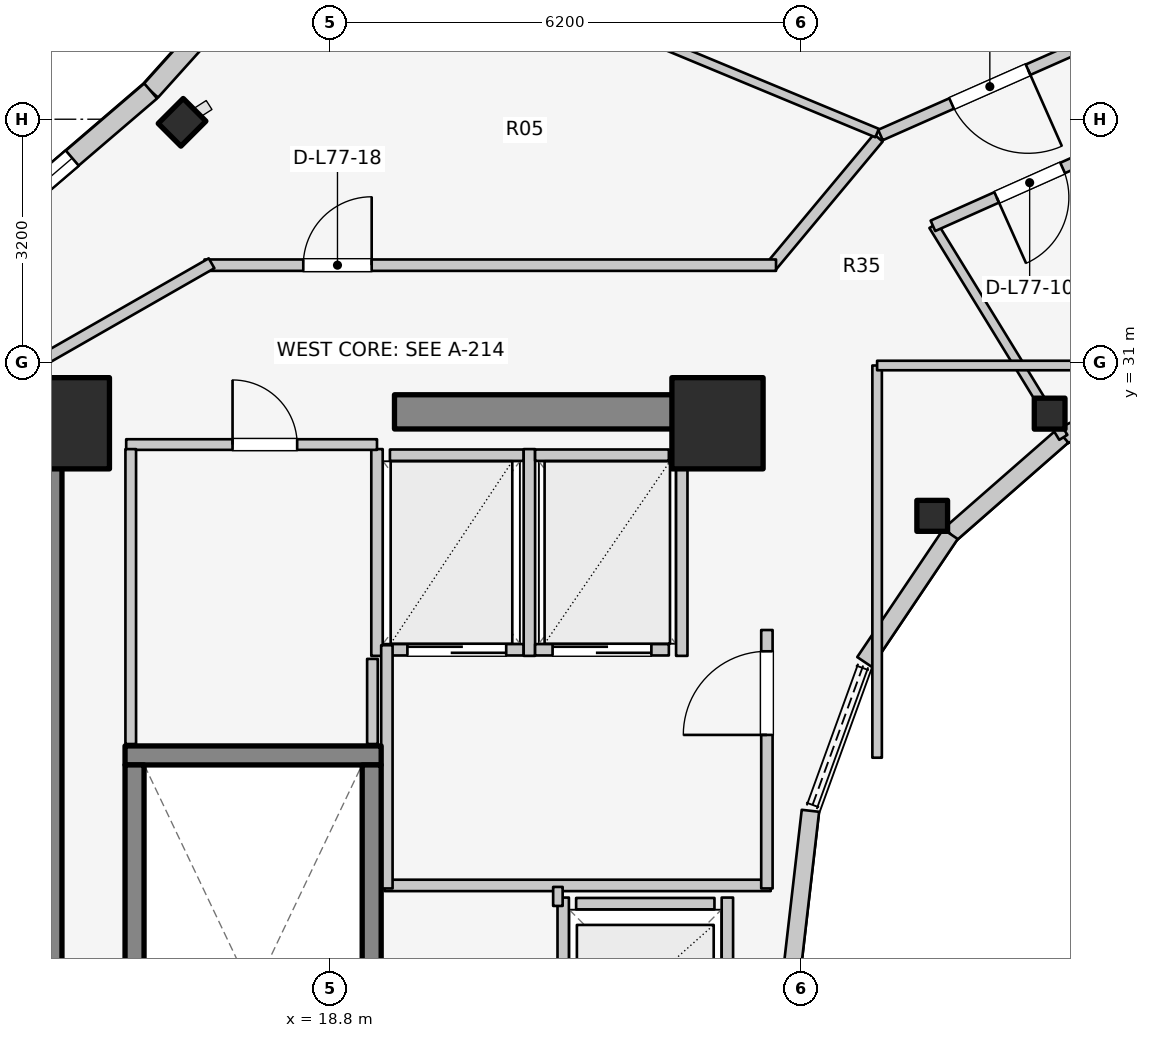
"""IFC4 building model, lengths in metres.
Left out: names, types, materials, properties, quantities, classifications, styles, units other than length and angle.
Written with IfcOpenShell. Run it as: python <this file> out.ifc"""

import sys

from ifc_helpers import new_model, si_unit, direction, frame, frame_2d, origin, origin_2d, place, context, subcontext, project, spatial, rectangle, i_section, extrude, element, fill, save


model = new_model("IFC4")
c1 = context("Model", 3, precision=1e-05, world=origin(), true_north=direction((0.0, 1.0)))
c2 = subcontext(c1, "Body", "Model", "MODEL_VIEW")
j1 = project(units=[si_unit("LENGTHUNIT", "METRE"), si_unit("PLANEANGLEUNIT", "RADIAN")], contexts=[c1])
p1 = place(None, origin())
s1 = spatial("IfcSite", under=j1, at=p1, CompositionType="ELEMENT")
p2 = place(p1, origin())
s2 = spatial("IfcBuilding", under=s1, at=p2, CompositionType="ELEMENT")
p3 = place(p2, frame((0.0, 0.0, 253.2)))
s3 = spatial("IfcBuildingStorey", under=s2, at=p3, CompositionType="ELEMENT", Elevation=253.2)
p4 = place(p3, frame((15.05, 17.05, 0.0), z_axis=(0.0, 0.0, 1.0), x_axis=(0.0, 1.0, 0.0)))
e1 = element("IfcWall", 1, at=p4, inside=s3, PredefinedType="SHEAR", context=c2, shape_type="SweptSolid", body=[
    extrude(rectangle(XDim=12.8, YDim=0.45, at=frame_2d((6.4, 0.0))), origin(), (0.0, 0.0, 1.0), 3.6),
])
p5 = place(p3, frame((19.65, 30.35, 0.0), z_axis=(0.0, 0.0, 1.0), x_axis=(1.0, 0.0, 0.0)))
e2 = element("IfcWall", 2, at=p5, inside=s3, PredefinedType="SHEAR", context=c2, shape_type="SweptSolid", body=[
    extrude(rectangle(XDim=4.5, YDim=0.45, at=frame_2d((2.25, 0.0))), origin(), (0.0, 0.0, 1.0), 3.6),
])
p6 = place(p3, frame((16.105, 25.83, 0.0), z_axis=(0.0, 0.0, 1.0), x_axis=(1.0, 0.0, 0.0)))
e3 = element("IfcWall", 3, at=p6, inside=s3, PredefinedType="SOLIDWALL", context=c2, shape_type="SweptSolid", body=[
    extrude(rectangle(XDim=3.37, YDim=0.25, at=frame_2d((1.685, 0.0))), origin(), (0.0, 0.0, 1.0), 3.6),
])
for number, where, z_axis, x_axis in (
    (4, (16.23, 17.895, 0.0), (0.0, 0.0, 1.0), (0.0, 1.0, 0.0)),
    (5, (19.35, 17.895, 0.0), (0.0, 0.0, 1.0), (0.0, 1.0, 0.0)),
):
    element("IfcWall", number, at=place(p3, frame(where, z_axis=z_axis, x_axis=x_axis)), inside=s3, PredefinedType="SOLIDWALL", context=c2, shape_type="SweptSolid", body=[
        extrude(rectangle(XDim=7.81, YDim=0.25, at=frame_2d((3.905, 0.0))), origin(), (0.0, 0.0, 1.0), 3.6),
    ])
for number, where, z_axis, x_axis in (
    (6, (23.9, 30.2, 0.0), (0.0, 0.0, 1.0), (1.0, 0.0, 0.0)),
    (7, (15.3, 30.2, 0.0), (0.0, 0.0, 1.0), (1.0, 0.0, 0.0)),
):
    element("IfcColumn", number, at=place(p3, frame(where, z_axis=z_axis, x_axis=x_axis)), inside=s3, PredefinedType="COLUMN", context=c2, shape_type="SweptSolid", body=[
        extrude(rectangle(XDim=1.2, YDim=1.2, at=origin_2d()), origin(), (0.0, 0.0, 1.0), 3.6),
    ])
for number, where, z_axis, x_axis in (
    (8, (28.27, 30.327, 0.0), (0.0, 0.0, 1.0), (1.0, 0.0, 0.0)),
    (9, (26.725, 28.982, 0.0), (0.0, 0.0, 1.0), (1.0, 0.0, 0.0)),
):
    element("IfcColumn", number, at=place(p3, frame(where, z_axis=z_axis, x_axis=x_axis)), inside=s3, PredefinedType="COLUMN", context=c2, shape_type="SweptSolid", body=[
        extrude(i_section(OverallWidth=0.404, OverallDepth=0.407, WebThickness=0.027, FlangeThickness=0.044, FilletRadius=0.025, at=origin_2d()), origin(), (0.0, 0.0, 1.0), 3.6),
    ])
p7 = place(p3, frame((16.855, 34.159, 0.0), z_axis=(0.0, 0.0, 1.0), x_axis=(-0.707106781187, 0.707106781187, 0.0)))
e10 = element("IfcColumn", 10, at=p7, inside=s3, PredefinedType="COLUMN", context=c2, shape_type="SweptSolid", body=[
    extrude(i_section(OverallWidth=0.422, OverallDepth=0.465, WebThickness=0.045, FlangeThickness=0.073, FilletRadius=0.025, at=origin_2d()), origin(), (0.0, 0.0, 1.0), 3.6),
])
p8 = place(p3, frame((30.157, 30.843, 0.0), z_axis=(0.0, 0.0, 1.0), x_axis=(-0.904179699603, -0.427152280606, 0.0)))
e11 = element("IfcWall", 11, at=p8, inside=s3, PredefinedType="STANDARD", context=c2, shape_type="SweptSolid", body=[
    extrude(rectangle(XDim=1.899, YDim=0.23, at=frame_2d((0.95, 0.0))), origin(), (0.0, 0.0, 1.0), 2.6),
])
p9 = place(p3, frame((28.44, 30.032, 0.0), z_axis=(0.0, 0.0, 1.0), x_axis=(-0.752576694707, -0.658504607869, 0.0)))
e12 = element("IfcWall", 12, at=p9, inside=s3, PredefinedType="STANDARD", context=c2, shape_type="SweptSolid", body=[
    extrude(rectangle(XDim=1.959, YDim=0.23, at=frame_2d((0.98, 0.0))), origin(), (0.0, 0.0, 1.0), 2.6),
])
p10 = place(p3, frame((26.965, 28.742, 0.0), z_axis=(0.0, 0.0, 1.0), x_axis=(-0.558197800898, -0.829707909492, 0.0)))
e13 = element("IfcWall", 13, at=p10, inside=s3, PredefinedType="STANDARD", context=c2, shape_type="SweptSolid", body=[
    extrude(rectangle(XDim=2.027, YDim=0.23, at=frame_2d((1.013, 0.0))), origin(), (0.0, 0.0, 1.0), 2.6),
])
p11 = place(p3, frame((25.123, 25.102, 0.0), z_axis=(0.0, 0.0, 1.0), x_axis=(-0.114711713601, -0.993398823617, 0.0)))
e14 = element("IfcWall", 14, at=p11, inside=s3, PredefinedType="STANDARD", context=c2, shape_type="SweptSolid", body=[
    extrude(rectangle(XDim=2.115, YDim=0.23, at=frame_2d((1.058, 0.0))), origin(), (0.0, 0.0, 1.0), 3.28),
])
p12 = place(p3, frame((20.13, 38.67, 0.0), z_axis=(0.0, 0.0, 1.0), x_axis=(-0.668903560134, -0.743349196031, 0.0)))
e15 = element("IfcWall", 15, at=p12, inside=s3, PredefinedType="STANDARD", context=c2, shape_type="SweptSolid", body=[
    extrude(rectangle(XDim=5.513, YDim=0.26, at=frame_2d((2.756, 0.0))), origin(), (0.0, 0.0, 1.0), 3.29),
])
p13 = place(p3, frame((16.442, 34.572, 0.0), z_axis=(0.0, 0.0, 1.0), x_axis=(-0.759587504333, -0.650405122413, 0.0)))
e16 = element("IfcWall", 16, at=p13, inside=s3, PredefinedType="STANDARD", context=c2, shape_type="SweptSolid", body=[
    extrude(rectangle(XDim=4.217, YDim=0.26, at=frame_2d((2.109, 0.0))), origin(), (0.0, 0.0, 1.0), 3.29),
])
p14 = place(p13, frame((1.359, 0.0, 0.75)))
e17 = element("IfcOpeningElement", 17, at=p14, cuts=e16, PredefinedType="OPENING", context=c2, shape_type="SweptSolid", body=[
    extrude(rectangle(XDim=1.5, YDim=1.6, at=frame_2d((0.75, 0.8))), frame((0.0, 0.14, 0.0), z_axis=(0.0, -1.0, 0.0), x_axis=(1.0, 0.0, 0.0)), (0.0, 0.0, 1.0), 0.28),
])
p15 = place(p3, frame((22.04, 23.88, 0.0), z_axis=(0.0, 0.0, 1.0), x_axis=(1.0, 0.0, 0.0)))
e18 = element("IfcWall", 18, at=p15, inside=s3, PredefinedType="SOLIDWALL", context=c2, shape_type="SweptSolid", body=[
    extrude(rectangle(XDim=1.82, YDim=0.15, at=frame_2d((0.91, 0.0))), origin(), (0.0, 0.0, 1.0), 2.62),
])
p16 = place(p3, frame((21.87, 21.64, 0.0), z_axis=(0.0, 0.0, 1.0), x_axis=(0.0, 1.0, 0.0)))
e19 = element("IfcWall", 19, at=p16, inside=s3, PredefinedType="SOLIDWALL", context=c2, shape_type="SweptSolid", body=[
    extrude(rectangle(XDim=2.32, YDim=0.15, at=frame_2d((1.16, 0.0))), origin(), (0.0, 0.0, 1.0), 3.295),
])
p17 = place(p3, frame((24.03, 21.64, 0.0), z_axis=(0.0, 0.0, 1.0), x_axis=(0.0, 1.0, 0.0)))
e20 = element("IfcWall", 20, at=p17, inside=s3, PredefinedType="SOLIDWALL", context=c2, shape_type="SweptSolid", body=[
    extrude(rectangle(XDim=2.32, YDim=0.15, at=frame_2d((1.16, 0.0))), origin(), (0.0, 0.0, 1.0), 2.62),
])
p18 = place(p3, frame((19.59, 27.22, 0.0), z_axis=(0.0, 0.0, 1.0), x_axis=(1.0, 0.0, 0.0)))
e21 = element("IfcWall", 21, at=p18, inside=s3, PredefinedType="SOLIDWALL", context=c2, shape_type="SweptSolid", body=[
    extrude(rectangle(XDim=1.76, YDim=0.15, at=frame_2d((0.88, 0.0))), origin(), (0.0, 0.0, 1.0), 3.295),
])
p19 = place(p18, frame((0.23, 0.0, 0.0)))
e22 = element("IfcOpeningElement", 22, at=p19, cuts=e21, PredefinedType="OPENING", context=c2, shape_type="SweptSolid", body=[
    extrude(rectangle(XDim=1.3, YDim=2.1, at=frame_2d((0.65, 1.05))), frame((0.0, 0.085, 0.0), z_axis=(0.0, -1.0, 0.0), x_axis=(1.0, 0.0, 0.0)), (0.0, 0.0, 1.0), 0.17),
])
p20 = place(p3, frame((19.59, 29.78, 0.0), z_axis=(0.0, 0.0, 1.0), x_axis=(1.0, 0.0, 0.0)))
e23 = element("IfcWall", 23, at=p20, inside=s3, PredefinedType="SOLIDWALL", context=c2, shape_type="SweptSolid", body=[
    extrude(rectangle(XDim=1.76, YDim=0.15, at=frame_2d((0.88, 0.0))), origin(), (0.0, 0.0, 1.0), 3.295),
])
for number, where, z_axis, x_axis in (
    (24, (19.42, 27.14, 0.0), (0.0, 0.0, 1.0), (0.0, 1.0, 0.0)),
    (25, (21.425, 27.14, 0.0), (0.0, 0.0, 1.0), (0.0, 1.0, 0.0)),
):
    element("IfcWall", number, at=place(p3, frame(where, z_axis=z_axis, x_axis=x_axis)), inside=s3, PredefinedType="SOLIDWALL", context=c2, shape_type="SweptSolid", body=[
        extrude(rectangle(XDim=2.72, YDim=0.15, at=frame_2d((1.36, 0.0))), origin(), (0.0, 0.0, 1.0), 3.295),
    ])
p21 = place(p3, frame((21.5, 27.22, 0.0), z_axis=(0.0, 0.0, 1.0), x_axis=(1.0, 0.0, 0.0)))
e26 = element("IfcWall", 26, at=p21, inside=s3, PredefinedType="SOLIDWALL", context=c2, shape_type="SweptSolid", body=[
    extrude(rectangle(XDim=1.76, YDim=0.15, at=frame_2d((0.88, 0.0))), origin(), (0.0, 0.0, 1.0), 3.295),
])
p22 = place(p21, frame((0.23, 0.0, 0.0)))
e27 = element("IfcOpeningElement", 27, at=p22, cuts=e26, PredefinedType="OPENING", context=c2, shape_type="SweptSolid", body=[
    extrude(rectangle(XDim=1.3, YDim=2.1, at=frame_2d((0.65, 1.05))), frame((0.0, 0.085, 0.0), z_axis=(0.0, -1.0, 0.0), x_axis=(1.0, 0.0, 0.0)), (0.0, 0.0, 1.0), 0.17),
])
p23 = place(p3, frame((21.5, 29.78, 0.0), z_axis=(0.0, 0.0, 1.0), x_axis=(1.0, 0.0, 0.0)))
e28 = element("IfcWall", 28, at=p23, inside=s3, PredefinedType="SOLIDWALL", context=c2, shape_type="SweptSolid", body=[
    extrude(rectangle(XDim=1.76, YDim=0.15, at=frame_2d((0.88, 0.0))), origin(), (0.0, 0.0, 1.0), 3.295),
])
p24 = place(p3, frame((23.43, 27.14, 0.0), z_axis=(0.0, 0.0, 1.0), x_axis=(0.0, 1.0, 0.0)))
e29 = element("IfcWall", 29, at=p24, inside=s3, PredefinedType="SOLIDWALL", context=c2, shape_type="SweptSolid", body=[
    extrude(rectangle(XDim=2.72, YDim=0.15, at=frame_2d((1.36, 0.0))), origin(), (0.0, 0.0, 1.0), 3.295),
])
p25 = place(p3, frame((19.52, 24.12, 0.0), z_axis=(0.0, 0.0, 1.0), x_axis=(1.0, 0.0, 0.0)))
e30 = element("IfcWall", 30, at=p25, inside=s3, PredefinedType="PARTITIONING", context=c2, shape_type="SweptSolid", body=[
    extrude(rectangle(XDim=5.08, YDim=0.15, at=frame_2d((2.54, 0.0))), origin(), (0.0, 0.0, 1.0), 2.62),
])
p26 = place(p3, frame((19.55, 24.08, 0.0), z_axis=(0.0, 0.0, 1.0), x_axis=(0.0, 1.0, 0.0)))
e31 = element("IfcWall", 31, at=p26, inside=s3, PredefinedType="PARTITIONING", context=c2, shape_type="SweptSolid", body=[
    extrude(rectangle(XDim=3.2, YDim=0.15, at=frame_2d((1.6, 0.0))), origin(), (0.0, 0.0, 1.0), 3.295),
])
p27 = place(p3, frame((24.55, 24.08, 0.0), z_axis=(0.0, 0.0, 1.0), x_axis=(0.0, 1.0, 0.0)))
e32 = element("IfcWall", 32, at=p27, inside=s3, PredefinedType="PARTITIONING", context=c2, shape_type="SweptSolid", body=[
    extrude(rectangle(XDim=3.4, YDim=0.15, at=frame_2d((1.7, 0.0))), origin(), (0.0, 0.0, 1.0), 3.295),
])
p28 = place(p27, frame((2.02, 0.0, 0.0)))
e33 = element("IfcOpeningElement", 33, at=p28, cuts=e32, PredefinedType="OPENING", context=c2, shape_type="SweptSolid", body=[
    extrude(rectangle(XDim=1.1, YDim=2.1, at=frame_2d((0.55, 1.05))), frame((0.0, 0.085, 0.0), z_axis=(0.0, -1.0, 0.0), x_axis=(1.0, 0.0, 0.0)), (0.0, 0.0, 1.0), 0.17),
])
p29 = place(p3, frame((21.8, 23.85, 0.0), z_axis=(0.0, 0.0, 1.0), x_axis=(0.0, 1.0, 0.0)))
e34 = element("IfcWall", 34, at=p29, inside=s3, PredefinedType="PARTITIONING", context=c2, shape_type="SweptSolid", body=[
    extrude(rectangle(XDim=0.25, YDim=0.125, at=frame_2d((0.125, 0.0))), origin(), (0.0, 0.0, 1.0), 3.295),
])
p30 = place(p3, frame((16.12, 29.92, 0.0), z_axis=(0.0, 0.0, 1.0), x_axis=(1.0, 0.0, 0.0)))
e35 = element("IfcWall", 35, at=p30, inside=s3, PredefinedType="PLUMBINGWALL", context=c2, shape_type="SweptSolid", body=[
    extrude(rectangle(XDim=3.3, YDim=0.14, at=frame_2d((1.65, 0.0))), origin(), (0.0, 0.0, 1.0), 3.295),
])
p31 = place(p30, frame((1.399, 0.0, 0.0)))
e36 = element("IfcOpeningElement", 36, at=p31, cuts=e35, PredefinedType="OPENING", context=c2, shape_type="SweptSolid", body=[
    extrude(rectangle(XDim=0.85, YDim=2.05, at=frame_2d((0.425, 1.025))), frame((0.0, 0.08, 0.0), z_axis=(0.0, -1.0, 0.0), x_axis=(1.0, 0.0, 0.0)), (0.0, 0.0, 1.0), 0.16),
])
p32 = place(p3, frame((16.18, 25.98, 0.0), z_axis=(0.0, 0.0, 1.0), x_axis=(0.0, 1.0, 0.0)))
e37 = element("IfcWall", 37, at=p32, inside=s3, PredefinedType="PLUMBINGWALL", context=c2, shape_type="SweptSolid", body=[
    extrude(rectangle(XDim=3.88, YDim=0.14, at=frame_2d((1.94, 0.0))), origin(), (0.0, 0.0, 1.0), 3.295),
])
p33 = place(p3, frame((19.36, 25.98, 0.0), z_axis=(0.0, 0.0, 1.0), x_axis=(0.0, 1.0, 0.0)))
e38 = element("IfcWall", 38, at=p33, inside=s3, PredefinedType="PLUMBINGWALL", context=c2, shape_type="SweptSolid", body=[
    extrude(rectangle(XDim=1.12, YDim=0.14, at=frame_2d((0.56, 0.0))), origin(), (0.0, 0.0, 1.0), 3.295),
])
p34 = place(p3, frame((28.45, 30.015, 0.0), z_axis=(0.0, 0.0, 1.0), x_axis=(-0.522763432117, 0.852477796802, 0.0)))
e39 = element("IfcWall", 39, at=p34, inside=s3, PredefinedType="PARTITIONING", context=c2, shape_type="SweptSolid", body=[
    extrude(rectangle(XDim=3.269, YDim=0.125, at=frame_2d((1.635, 0.0))), origin(), (0.0, 0.0, 1.0), 2.672),
])
p35 = place(p3, frame((29.28, 33.933, 0.0), z_axis=(0.0, 0.0, 1.0), x_axis=(-0.913254317828, -0.407389924971, 0.0)))
e40 = element("IfcWall", 40, at=p35, inside=s3, PredefinedType="PARTITIONING", context=c2, shape_type="SweptSolid", body=[
    extrude(rectangle(XDim=2.787, YDim=0.15, at=frame_2d((1.393, 0.0))), origin(), (0.0, 0.0, 1.0), 2.823),
])
p36 = place(p35, frame((0.918, 0.0, 0.0)))
e41 = element("IfcOpeningElement", 41, at=p36, cuts=e40, PredefinedType="OPENING", context=c2, shape_type="SweptSolid", body=[
    extrude(rectangle(XDim=0.95, YDim=2.1, at=frame_2d((0.475, 1.05))), frame((0.0, 0.085, 0.0), z_axis=(0.0, -1.0, 0.0), x_axis=(1.0, 0.0, 0.0)), (0.0, 0.0, 1.0), 0.17),
])
p37 = place(p3, frame((26.0, 25.8, 0.0), z_axis=(0.0, 0.0, 1.0), x_axis=(0.0, 1.0, 0.0)))
e42 = element("IfcWall", 42, at=p37, inside=s3, PredefinedType="PARTITIONING", context=c2, shape_type="SweptSolid", body=[
    extrude(rectangle(XDim=5.16, YDim=0.125, at=frame_2d((2.58, 0.0))), origin(), (0.0, 0.0, 1.0), 2.672),
])
p38 = place(p3, frame((26.0, 30.96, 0.0), z_axis=(0.0, 0.0, 1.0), x_axis=(1.0, 0.0, 0.0)))
e43 = element("IfcWall", 43, at=p38, inside=s3, PredefinedType="PARTITIONING", context=c2, shape_type="SweptSolid", body=[
    extrude(rectangle(XDim=2.6, YDim=0.125, at=frame_2d((1.3, 0.0))), origin(), (0.0, 0.0, 1.0), 2.816),
])
p39 = place(p3, frame((26.016, 33.955, 0.0), z_axis=(0.0, 0.0, 1.0), x_axis=(-0.64030392053, -0.76812166312, 0.0)))
e44 = element("IfcWall", 44, at=p39, inside=s3, PredefinedType="PARTITIONING", context=c2, shape_type="SweptSolid", body=[
    extrude(rectangle(XDim=2.21, YDim=0.15, at=frame_2d((1.105, 0.0))), origin(), (0.0, 0.0, 1.0), 2.816),
])
p40 = place(p3, frame((17.15, 32.28, 0.0), z_axis=(0.0, 0.0, 1.0), x_axis=(1.0, 0.0, 0.0)))
e45 = element("IfcWall", 45, at=p40, inside=s3, PredefinedType="PARTITIONING", context=c2, shape_type="SweptSolid", body=[
    extrude(rectangle(XDim=7.52, YDim=0.15, at=frame_2d((3.76, 0.0))), origin(), (0.0, 0.0, 1.0), 2.816),
])
p41 = place(p40, frame((1.3, 0.0, 0.0)))
e46 = element("IfcOpeningElement", 46, at=p41, cuts=e45, PredefinedType="OPENING", context=c2, shape_type="SweptSolid", body=[
    extrude(rectangle(XDim=0.9, YDim=2.1, at=frame_2d((0.45, 1.05))), frame((0.0, 0.085, 0.0), z_axis=(0.0, -1.0, 0.0), x_axis=(1.0, 0.0, 0.0)), (0.0, 0.0, 1.0), 0.17),
])
p42 = place(p3, frame((17.243, 32.305, 0.0), z_axis=(0.0, 0.0, 1.0), x_axis=(-0.867991349648, -0.496579315857, 0.0)))
e47 = element("IfcWall", 47, at=p42, inside=s3, PredefinedType="PARTITIONING", context=c2, shape_type="SweptSolid", body=[
    extrude(rectangle(XDim=2.567, YDim=0.15, at=frame_2d((1.283, 0.0))), origin(), (0.0, 0.0, 1.0), 2.66),
])
p43 = place(p3, frame((26.0, 34.018, 0.0), z_axis=(0.0, 0.0, 1.0), x_axis=(-0.92349333748, 0.383614462228, 0.0)))
e48 = element("IfcWall", 48, at=p43, inside=s3, PredefinedType="MOVABLE", context=c2, shape_type="SweptSolid", body=[
    extrude(rectangle(XDim=5.907, YDim=0.12, at=frame_2d((2.954, 0.0))), origin(), (0.0, 0.0, 1.0), 2.66),
])
p44 = place(p3, frame((28.923, 35.266, 0.0), z_axis=(0.0, 0.0, 1.0), x_axis=(-0.914526509772, -0.404525973115, 0.0)))
e49 = element("IfcWall", 49, at=p44, inside=s3, PredefinedType="PARTITIONING", context=c2, shape_type="SweptSolid", body=[
    extrude(rectangle(XDim=3.148, YDim=0.15, at=frame_2d((1.574, 0.0))), origin(), (0.0, 0.0, 1.0), 2.823),
])
p45 = place(p44, frame((1.024, 0.0, 0.0)))
e50 = element("IfcOpeningElement", 50, at=p45, cuts=e49, PredefinedType="OPENING", context=c2, shape_type="SweptSolid", body=[
    extrude(rectangle(XDim=1.1, YDim=2.1, at=frame_2d((0.55, 1.05))), frame((0.0, 0.085, 0.0), z_axis=(0.0, -1.0, 0.0), x_axis=(1.0, 0.0, 0.0)), (0.0, 0.0, 1.0), 0.17),
])
p46 = place(p14, origin())
e51 = element("IfcWindow", 51, at=p46, inside=s3, PartitioningType="SINGLE_PANEL", PredefinedType="WINDOW", context=c2, shape_type="SweptSolid", body=[
    extrude(rectangle(XDim=1.5, YDim=1.6, at=frame_2d((0.75, 0.8))), frame((0.0, 0.03, 0.0), z_axis=(0.0, -1.0, 0.0), x_axis=(1.0, 0.0, 0.0)), (0.0, 0.0, 1.0), 0.06),
])
fill(e17, e51)
p47 = place(p19, origin())
e52 = element("IfcDoor", 52, at=p47, inside=s3, OperationType="DOUBLE_DOOR_SLIDING", PredefinedType="DOOR", context=c2, shape_type="SweptSolid", body=[
    extrude(rectangle(XDim=1.3, YDim=2.1, at=frame_2d((0.65, 1.05))), frame((0.0, 0.025, 0.0), z_axis=(0.0, -1.0, 0.0), x_axis=(1.0, 0.0, 0.0)), (0.0, 0.0, 1.0), 0.05),
])
fill(e22, e52)
p48 = place(p22, origin())
e53 = element("IfcDoor", 53, at=p48, inside=s3, OperationType="DOUBLE_DOOR_SLIDING", PredefinedType="DOOR", context=c2, shape_type="SweptSolid", body=[
    extrude(rectangle(XDim=1.3, YDim=2.1, at=frame_2d((0.65, 1.05))), frame((0.0, 0.025, 0.0), z_axis=(0.0, -1.0, 0.0), x_axis=(1.0, 0.0, 0.0)), (0.0, 0.0, 1.0), 0.05),
])
fill(e27, e53)
p49 = place(p28, origin())
e54 = element("IfcDoor", 54, at=p49, inside=s3, OperationType="SINGLE_SWING_LEFT", PredefinedType="DOOR", context=c2, shape_type="SweptSolid", body=[
    extrude(rectangle(XDim=1.1, YDim=2.1, at=frame_2d((0.55, 1.05))), frame((0.0, 0.025, 0.0), z_axis=(0.0, -1.0, 0.0), x_axis=(1.0, 0.0, 0.0)), (0.0, 0.0, 1.0), 0.05),
])
fill(e33, e54)
p50 = place(p31, origin())
e55 = element("IfcDoor", 55, at=p50, inside=s3, OperationType="SINGLE_SWING_LEFT", PredefinedType="DOOR", context=c2, shape_type="SweptSolid", body=[
    extrude(rectangle(XDim=0.85, YDim=2.05, at=frame_2d((0.425, 1.025))), frame((0.0, 0.025, 0.0), z_axis=(0.0, -1.0, 0.0), x_axis=(1.0, 0.0, 0.0)), (0.0, 0.0, 1.0), 0.05),
])
fill(e36, e55)
p51 = place(p36, origin())
e56 = element("IfcDoor", 56, at=p51, inside=s3, OperationType="SINGLE_SWING_RIGHT", PredefinedType="DOOR", context=c2, shape_type="SweptSolid", body=[
    extrude(rectangle(XDim=0.95, YDim=2.1, at=frame_2d((0.475, 1.05))), frame((0.0, 0.025, 0.0), z_axis=(0.0, -1.0, 0.0), x_axis=(1.0, 0.0, 0.0)), (0.0, 0.0, 1.0), 0.05),
])
fill(e41, e56)
p52 = place(p41, origin())
e57 = element("IfcDoor", 57, at=p52, inside=s3, OperationType="SINGLE_SWING_RIGHT", PredefinedType="DOOR", context=c2, shape_type="SweptSolid", body=[
    extrude(rectangle(XDim=0.9, YDim=2.1, at=frame_2d((0.45, 1.05))), frame((0.0, 0.025, 0.0), z_axis=(0.0, -1.0, 0.0), x_axis=(1.0, 0.0, 0.0)), (0.0, 0.0, 1.0), 0.05),
])
fill(e46, e57)
p53 = place(p45, origin())
e58 = element("IfcDoor", 58, at=p53, inside=s3, OperationType="SINGLE_SWING_LEFT", PredefinedType="DOOR", context=c2, shape_type="SweptSolid", body=[
    extrude(rectangle(XDim=1.1, YDim=2.1, at=frame_2d((0.55, 1.05))), frame((0.0, 0.025, 0.0), z_axis=(0.0, -1.0, 0.0), x_axis=(1.0, 0.0, 0.0)), (0.0, 0.0, 1.0), 0.05),
])
fill(e50, e58)
save(model, sys.argv[1])
